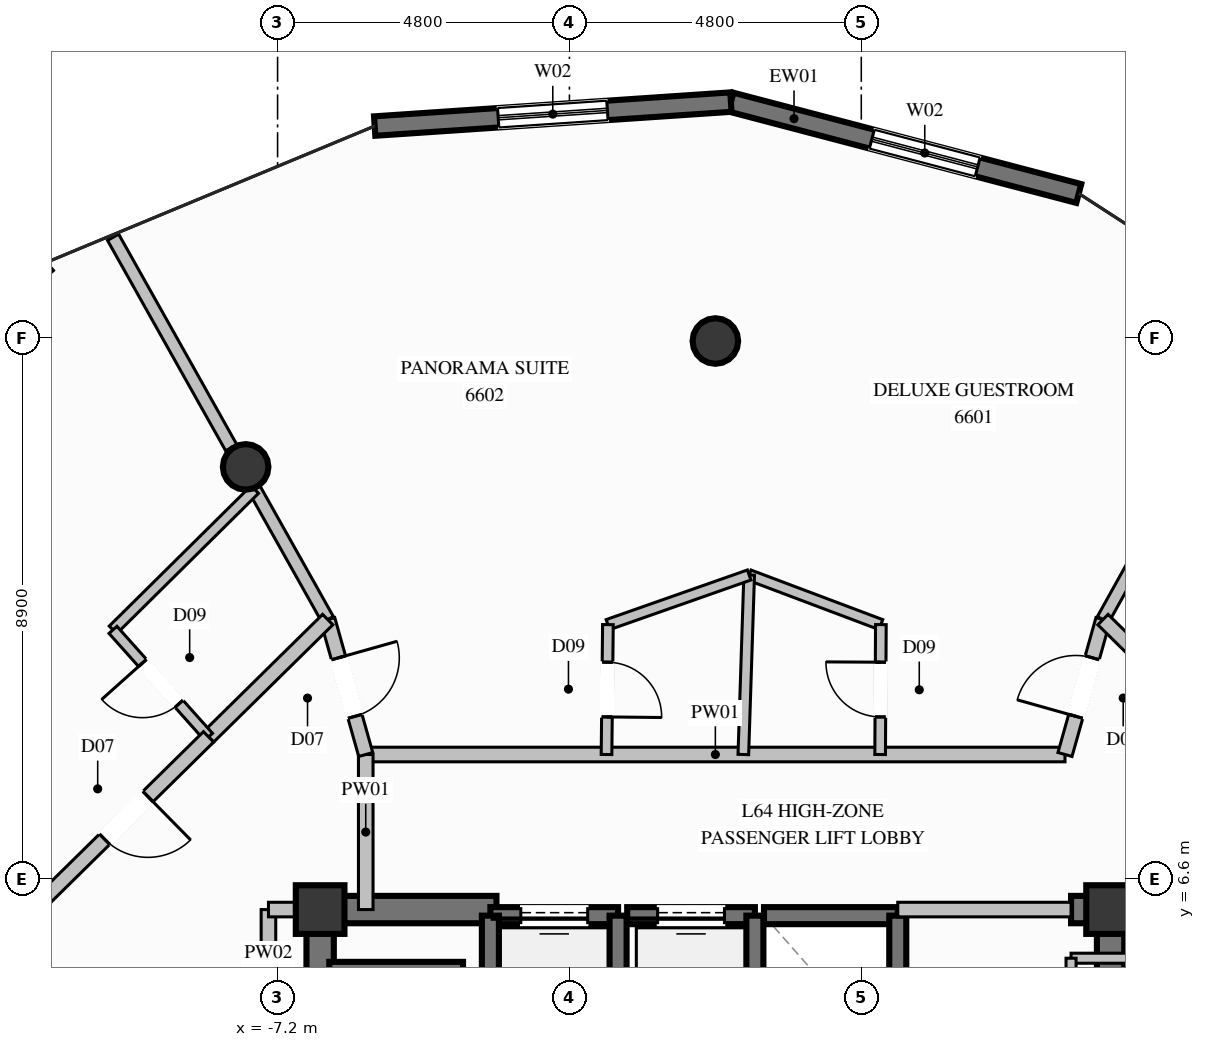
"""IFC4 building model, lengths in metres.
Left out: names, types, materials, properties, quantities, classifications, styles, units other than length and angle.
Written with IfcOpenShell. Run it as: python <this file> out.ifc"""

import sys

from ifc_helpers import new_model, si_unit, direction, frame, frame_2d, origin, origin_2d, place, context, subcontext, project, spatial, rectangle, circle, extrude, element, fill, save


model = new_model("IFC4")
c1 = context("Model", 3, precision=1e-05, world=origin(), true_north=direction((0.0, 1.0)))
c2 = subcontext(c1, "Body", "Model", "MODEL_VIEW")
j1 = project(units=[si_unit("LENGTHUNIT", "METRE"), si_unit("PLANEANGLEUNIT", "RADIAN")], contexts=[c1])
p1 = place(None, origin())
s1 = spatial("IfcSite", under=j1, at=p1, CompositionType="ELEMENT")
p2 = place(p1, origin())
s2 = spatial("IfcBuilding", under=s1, at=p2, CompositionType="ELEMENT")
p3 = place(p2, frame((0.0, 0.0, 246.8)))
s3 = spatial("IfcBuildingStorey", under=s2, at=p3, CompositionType="ELEMENT", Elevation=246.8)
for number, where, z_axis, x_axis in (
    (1, (6.5, 6.1, 0.0), (0.0, 0.0, 1.0), (1.0, 0.0, 0.0)),
    (2, (-6.5, 6.1, 0.0), (0.0, 0.0, 1.0), (1.0, 0.0, 0.0)),
):
    element("IfcColumn", number, at=place(p3, frame(where, z_axis=z_axis, x_axis=x_axis)), inside=s3, PredefinedType="COLUMN", context=c2, shape_type="SweptSolid", body=[
        extrude(rectangle(XDim=0.8, YDim=0.8, at=origin_2d()), origin(), (0.0, 0.0, 1.0), 3.8),
    ])
p4 = place(p3, frame((-6.275, 6.1, 0.0), z_axis=(0.0, 0.0, 1.0), x_axis=(1.0, 0.0, 0.0)))
e3 = element("IfcWall", 3, at=p4, inside=s3, PredefinedType="SHEAR", context=c2, shape_type="SweptSolid", body=[
    extrude(rectangle(XDim=2.675, YDim=0.45, at=frame_2d((1.337, 0.0))), origin(), (0.0, 0.0, 1.0), 3.8),
])
p5 = place(p3, frame((5.85, 6.1, 0.0), z_axis=(0.0, 0.0, 1.0), x_axis=(1.0, 0.0, 0.0)))
e4 = element("IfcWall", 4, at=p5, inside=s3, PredefinedType="SHEAR", context=c2, shape_type="SweptSolid", body=[
    extrude(rectangle(XDim=0.425, YDim=0.45, at=frame_2d((0.212, 0.0))), origin(), (0.0, 0.0, 1.0), 3.8),
])
p6 = place(p3, frame((-6.5, 2.35, 0.0), z_axis=(0.0, 0.0, 1.0), x_axis=(0.0, 1.0, 0.0)))
e5 = element("IfcWall", 5, at=p6, inside=s3, PredefinedType="SHEAR", context=c2, shape_type="SweptSolid", body=[
    extrude(rectangle(XDim=3.975, YDim=0.45, at=frame_2d((1.987, 0.0))), origin(), (0.0, 0.0, 1.0), 3.8),
])
p7 = place(p3, frame((6.5, 3.35, 0.0), z_axis=(0.0, 0.0, 1.0), x_axis=(0.0, 1.0, 0.0)))
e6 = element("IfcWall", 6, at=p7, inside=s3, PredefinedType="SHEAR", context=c2, shape_type="SweptSolid", body=[
    extrude(rectangle(XDim=2.975, YDim=0.45, at=frame_2d((1.487, 0.0))), origin(), (0.0, 0.0, 1.0), 3.8),
])
for number, where, z_axis, x_axis in (
    (7, (0.0, 15.45, 0.0), (0.0, 0.0, 1.0), (1.0, 0.0, 0.0)),
    (8, (-7.725, 13.38, 0.0), (0.0, 0.0, 1.0), (1.0, 0.0, 0.0)),
):
    element("IfcColumn", number, at=place(p3, frame(where, z_axis=z_axis, x_axis=x_axis)), inside=s3, PredefinedType="COLUMN", context=c2, shape_type="SweptSolid", body=[
        extrude(circle(Radius=0.375, at=origin_2d()), origin(), (0.0, 0.0, 1.0), 3.8),
    ])
p8 = place(p3, frame((0.256, 19.379, 0.0), z_axis=(0.0, 0.0, 1.0), x_axis=(0.967181914063, -0.254084917124, 0.0)))
e9 = element("IfcWall", 9, at=p8, inside=s3, PredefinedType="SOLIDWALL", context=c2, shape_type="SweptSolid", body=[
    extrude(rectangle(XDim=5.915, YDim=0.32, at=frame_2d((2.958, 0.0))), origin(), (0.0, 0.0, 1.0), 3.57),
])
p9 = place(p8, frame((2.396, 0.0, 0.35)))
e10 = element("IfcOpeningElement", 10, at=p9, cuts=e9, PredefinedType="OPENING", context=c2, shape_type="SweptSolid", body=[
    extrude(rectangle(XDim=1.8, YDim=2.6, at=frame_2d((0.9, 1.3))), frame((0.0, 0.17, 0.0), z_axis=(0.0, -1.0, 0.0), x_axis=(1.0, 0.0, 0.0)), (0.0, 0.0, 1.0), 0.34),
])
p10 = place(p3, frame((-5.603, 18.985, 0.0), z_axis=(0.0, 0.0, 1.0), x_axis=(0.997748955427, 0.067059838539, 0.0)))
e11 = element("IfcWall", 11, at=p10, inside=s3, PredefinedType="SOLIDWALL", context=c2, shape_type="SweptSolid", body=[
    extrude(rectangle(XDim=5.872, YDim=0.32, at=frame_2d((2.936, 0.0))), origin(), (0.0, 0.0, 1.0), 3.57),
])
p11 = place(p10, frame((2.036, 0.0, 0.35)))
e12 = element("IfcOpeningElement", 12, at=p11, cuts=e11, PredefinedType="OPENING", context=c2, shape_type="SweptSolid", body=[
    extrude(rectangle(XDim=1.8, YDim=2.6, at=frame_2d((0.9, 1.3))), frame((0.0, 0.17, 0.0), z_axis=(0.0, -1.0, 0.0), x_axis=(1.0, 0.0, 0.0)), (0.0, 0.0, 1.0), 0.34),
])
p12 = place(p3, frame((-1.6, 6.0, 0.0), z_axis=(0.0, 0.0, 1.0), x_axis=(-1.0, 0.0, 0.0)))
e13 = element("IfcWall", 13, at=p12, inside=s3, PredefinedType="SOLIDWALL", context=c2, shape_type="SweptSolid", body=[
    extrude(rectangle(XDim=2.1, YDim=0.28, at=frame_2d((1.05, 0.0))), origin(), (0.0, 0.0, 1.0), 3.57),
])
p13 = place(p12, frame((0.5, 0.0, 0.0)))
e14 = element("IfcOpeningElement", 14, at=p13, cuts=e13, PredefinedType="OPENING", context=c2, shape_type="SweptSolid", body=[
    extrude(rectangle(XDim=1.1, YDim=2.2, at=frame_2d((0.55, 1.1))), frame((0.0, 0.15, 0.0), z_axis=(0.0, -1.0, 0.0), x_axis=(1.0, 0.0, 0.0)), (0.0, 0.0, 1.0), 0.3),
])
for number, where, z_axis, x_axis in (
    (15, (-3.7, 6.0, 0.0), (0.0, 0.0, 1.0), (0.0, -1.0, 0.0)),
    (16, (-1.6, 3.5, 0.0), (0.0, 0.0, 1.0), (0.0, 1.0, 0.0)),
):
    element("IfcWall", number, at=place(p3, frame(where, z_axis=z_axis, x_axis=x_axis)), inside=s3, PredefinedType="SOLIDWALL", context=c2, shape_type="SweptSolid", body=[
        extrude(rectangle(XDim=2.5, YDim=0.28, at=frame_2d((1.25, 0.0))), origin(), (0.0, 0.0, 1.0), 3.57),
    ])
p14 = place(p3, frame((0.65, 6.0, 0.0), z_axis=(0.0, 0.0, 1.0), x_axis=(-1.0, 0.0, 0.0)))
e17 = element("IfcWall", 17, at=p14, inside=s3, PredefinedType="SOLIDWALL", context=c2, shape_type="SweptSolid", body=[
    extrude(rectangle(XDim=2.1, YDim=0.28, at=frame_2d((1.05, 0.0))), origin(), (0.0, 0.0, 1.0), 3.57),
])
p15 = place(p14, frame((0.5, 0.0, 0.0)))
e18 = element("IfcOpeningElement", 18, at=p15, cuts=e17, PredefinedType="OPENING", context=c2, shape_type="SweptSolid", body=[
    extrude(rectangle(XDim=1.1, YDim=2.2, at=frame_2d((0.55, 1.1))), frame((0.0, 0.15, 0.0), z_axis=(0.0, -1.0, 0.0), x_axis=(1.0, 0.0, 0.0)), (0.0, 0.0, 1.0), 0.3),
])
p16 = place(p3, frame((0.65, 3.5, 0.0), z_axis=(0.0, 0.0, 1.0), x_axis=(0.0, 1.0, 0.0)))
e19 = element("IfcWall", 19, at=p16, inside=s3, PredefinedType="SOLIDWALL", context=c2, shape_type="SweptSolid", body=[
    extrude(rectangle(XDim=2.5, YDim=0.28, at=frame_2d((1.25, 0.0))), origin(), (0.0, 0.0, 1.0), 3.57),
])
p17 = place(p3, frame((3.0, 6.0, 0.0), z_axis=(0.0, 0.0, 1.0), x_axis=(-1.0, 0.0, 0.0)))
e20 = element("IfcWall", 20, at=p17, inside=s3, PredefinedType="SOLIDWALL", context=c2, shape_type="SweptSolid", body=[
    extrude(rectangle(XDim=2.2, YDim=0.28, at=frame_2d((1.1, 0.0))), origin(), (0.0, 0.0, 1.0), 3.57),
])
p18 = place(p3, frame((3.0, 3.5, 0.0), z_axis=(0.0, 0.0, 1.0), x_axis=(0.0, 1.0, 0.0)))
e21 = element("IfcWall", 21, at=p18, inside=s3, PredefinedType="SOLIDWALL", context=c2, shape_type="SweptSolid", body=[
    extrude(rectangle(XDim=2.5, YDim=0.28, at=frame_2d((1.25, 0.0))), origin(), (0.0, 0.0, 1.0), 3.57),
])
p19 = place(p3, frame((-4.15, 5.1, 0.0), z_axis=(0.0, 0.0, 1.0), x_axis=(-1.0, 0.0, 0.0)))
e22 = element("IfcWall", 22, at=p19, inside=s3, PredefinedType="SOLIDWALL", context=c2, shape_type="SweptSolid", body=[
    extrude(rectangle(XDim=2.2, YDim=0.28, at=frame_2d((1.1, 0.0))), origin(), (0.0, 0.0, 1.0), 3.57),
])
p20 = place(p3, frame((-5.75, 8.65, 0.0), z_axis=(0.0, 0.0, 1.0), x_axis=(1.0, 0.0, 0.0)))
e23 = element("IfcWall", 23, at=p20, inside=s3, PredefinedType="PARTITIONING", context=c2, shape_type="SweptSolid", body=[
    extrude(rectangle(XDim=11.5, YDim=0.24, at=frame_2d((5.75, 0.0))), origin(), (0.0, 0.0, 1.0), 3.57),
])
p21 = place(p3, frame((3.0, 6.1, 0.0), z_axis=(0.0, 0.0, 1.0), x_axis=(1.0, 0.0, 0.0)))
e24 = element("IfcWall", 24, at=p21, inside=s3, PredefinedType="PARTITIONING", context=c2, shape_type="SweptSolid", body=[
    extrude(rectangle(XDim=2.85, YDim=0.24, at=frame_2d((1.425, 0.0))), origin(), (0.0, 0.0, 1.0), 2.655),
])
p22 = place(p3, frame((6.5, 6.1, 0.0), z_axis=(0.0, 0.0, 1.0), x_axis=(1.0, 0.0, 0.0)))
e25 = element("IfcWall", 25, at=p22, inside=s3, PredefinedType="PARTITIONING", context=c2, shape_type="SweptSolid", body=[
    extrude(rectangle(XDim=0.85, YDim=0.24, at=frame_2d((0.425, 0.0))), origin(), (0.0, 0.0, 1.0), 3.011),
])
p23 = place(p3, frame((-5.75, 6.1, 0.0), z_axis=(0.0, 0.0, 1.0), x_axis=(0.0, 1.0, 0.0)))
e26 = element("IfcWall", 26, at=p23, inside=s3, PredefinedType="PARTITIONING", context=c2, shape_type="SweptSolid", body=[
    extrude(rectangle(XDim=2.55, YDim=0.24, at=frame_2d((1.275, 0.0))), origin(), (0.0, 0.0, 1.0), 3.57),
])
p24 = place(p3, frame((-7.35, 4.95, 0.0), z_axis=(0.0, 0.0, 1.0), x_axis=(0.0, 1.0, 0.0)))
e27 = element("IfcWall", 27, at=p24, inside=s3, PredefinedType="PARTITIONING", context=c2, shape_type="SweptSolid", body=[
    extrude(rectangle(XDim=1.15, YDim=0.24, at=frame_2d((0.575, 0.0))), origin(), (0.0, 0.0, 1.0), 2.655),
])
p25 = place(p3, frame((-7.35, 6.1, 0.0), z_axis=(0.0, 0.0, 1.0), x_axis=(1.0, 0.0, 0.0)))
e28 = element("IfcWall", 28, at=p25, inside=s3, PredefinedType="PARTITIONING", context=c2, shape_type="SweptSolid", body=[
    extrude(rectangle(XDim=0.85, YDim=0.24, at=frame_2d((0.425, 0.0))), origin(), (0.0, 0.0, 1.0), 3.011),
])
p26 = place(p3, frame((7.35, 5.3, 0.0), z_axis=(0.0, 0.0, 1.0), x_axis=(-1.0, 0.0, 0.0)))
e29 = element("IfcWall", 29, at=p26, inside=s3, PredefinedType="PARTITIONING", context=c2, shape_type="SweptSolid", body=[
    extrude(rectangle(XDim=1.5, YDim=0.165, at=frame_2d((0.75, 0.0))), origin(), (0.0, 0.0, 1.0), 2.655),
])
p27 = place(p3, frame((5.85, 5.3, 0.0), z_axis=(0.0, 0.0, 1.0), x_axis=(0.0, -1.0, 0.0)))
e30 = element("IfcWall", 30, at=p27, inside=s3, PredefinedType="PARTITIONING", context=c2, shape_type="SweptSolid", body=[
    extrude(rectangle(XDim=2.55, YDim=0.165, at=frame_2d((1.275, 0.0))), origin(), (0.0, 0.0, 1.0), 2.655),
])
p28 = place(p3, frame((6.375, 10.869, 0.0), z_axis=(0.0, 0.0, 1.0), x_axis=(0.486620940413, 0.873613221255, 0.0)))
e31 = element("IfcWall", 31, at=p28, inside=s3, PredefinedType="PARTITIONING", context=c2, shape_type="SweptSolid", body=[
    extrude(rectangle(XDim=2.458, YDim=0.21, at=frame_2d((1.229, 0.0))), origin(), (0.0, 0.0, 1.0), 3.011),
])
p29 = place(p3, frame((-6.375, 10.869, 0.0), z_axis=(0.0, 0.0, 1.0), x_axis=(-0.489667191284, 0.871909422922, 0.0)))
e32 = element("IfcWall", 32, at=p29, inside=s3, PredefinedType="PARTITIONING", context=c2, shape_type="SweptSolid", body=[
    extrude(rectangle(XDim=2.459, YDim=0.21, at=frame_2d((1.229, 0.0))), origin(), (0.0, 0.0, 1.0), 3.011),
])
p30 = place(p3, frame((-7.962, 13.696, 0.0), z_axis=(0.0, 0.0, 1.0), x_axis=(-0.489665242016, 0.871910517634, 0.0)))
e33 = element("IfcWall", 33, at=p30, inside=s3, PredefinedType="PARTITIONING", context=c2, shape_type="SweptSolid", body=[
    extrude(rectangle(XDim=3.968, YDim=0.21, at=frame_2d((1.984, 0.0))), origin(), (0.0, 0.0, 1.0), 3.57),
])
p31 = place(p3, frame((0.556, 11.602, 0.0), z_axis=(0.0, 0.0, 1.0), x_axis=(0.935773181831, -0.35260254135, 0.0)))
e34 = element("IfcWall", 34, at=p31, inside=s3, PredefinedType="PLUMBINGWALL", context=c2, shape_type="SweptSolid", body=[
    extrude(rectangle(XDim=2.315, YDim=0.175, at=frame_2d((1.157, 0.0))), origin(), (0.0, 0.0, 1.0), 3.252),
])
p32 = place(p3, frame((0.556, 11.602, 0.0), z_axis=(0.0, 0.0, 1.0), x_axis=(-0.032483675207, -0.999472266171, 0.0)))
e35 = element("IfcWall", 35, at=p32, inside=s3, PredefinedType="PLUMBINGWALL", context=c2, shape_type="SweptSolid", body=[
    extrude(rectangle(XDim=2.954, YDim=0.175, at=frame_2d((1.477, 0.0))), origin(), (0.0, 0.0, 1.0), 3.57),
])
p33 = place(p3, frame((2.71, 8.65, 0.0), z_axis=(0.0, 0.0, 1.0), x_axis=(0.005600552237, 0.999984316784, 0.0)))
e36 = element("IfcWall", 36, at=p33, inside=s3, PredefinedType="PLUMBINGWALL", context=c2, shape_type="SweptSolid", body=[
    extrude(rectangle(XDim=2.136, YDim=0.175, at=frame_2d((1.068, 0.0))), origin(), (0.0, 0.0, 1.0), 3.57),
])
p34 = place(p33, frame((0.618, 0.0, 0.0)))
e37 = element("IfcOpeningElement", 37, at=p34, cuts=e36, PredefinedType="OPENING", context=c2, shape_type="SweptSolid", body=[
    extrude(rectangle(XDim=0.9, YDim=2.1, at=frame_2d((0.45, 1.05))), frame((0.0, 0.098, 0.0), z_axis=(0.0, -1.0, 0.0), x_axis=(1.0, 0.0, 0.0)), (0.0, 0.0, 1.0), 0.195),
])
p35 = place(p3, frame((5.75, 8.65, 0.0), z_axis=(0.0, 0.0, 1.0), x_axis=(0.271110513922, 0.962548226969, 0.0)))
e38 = element("IfcWall", 38, at=p35, inside=s3, PredefinedType="PARTITIONING", context=c2, shape_type="SweptSolid", body=[
    extrude(rectangle(XDim=2.305, YDim=0.24, at=frame_2d((1.153, 0.0))), origin(), (0.0, 0.0, 1.0), 3.57),
])
p36 = place(p35, frame((0.653, 0.0, 0.0)))
e39 = element("IfcOpeningElement", 39, at=p36, cuts=e38, PredefinedType="OPENING", context=c2, shape_type="SweptSolid", body=[
    extrude(rectangle(XDim=1.0, YDim=2.2, at=frame_2d((0.5, 1.1))), frame((0.0, 0.13, 0.0), z_axis=(0.0, -1.0, 0.0), x_axis=(1.0, 0.0, 0.0)), (0.0, 0.0, 1.0), 0.26),
])
p37 = place(p3, frame((-1.767, 10.786, 0.0), z_axis=(0.0, 0.0, 1.0), x_axis=(0.943463492061, 0.331476453385, 0.0)))
e40 = element("IfcWall", 40, at=p37, inside=s3, PredefinedType="PLUMBINGWALL", context=c2, shape_type="SweptSolid", body=[
    extrude(rectangle(XDim=2.462, YDim=0.175, at=frame_2d((1.231, 0.0))), origin(), (0.0, 0.0, 1.0), 3.252),
])
p38 = place(p3, frame((-1.767, 10.786, 0.0), z_axis=(0.0, 0.0, 1.0), x_axis=(-0.010743464968, -0.999942287315, 0.0)))
e41 = element("IfcWall", 41, at=p38, inside=s3, PredefinedType="PLUMBINGWALL", context=c2, shape_type="SweptSolid", body=[
    extrude(rectangle(XDim=2.136, YDim=0.175, at=frame_2d((1.068, 0.0))), origin(), (0.0, 0.0, 1.0), 3.57),
])
p39 = place(p38, frame((0.618, 0.0, 0.0)))
e42 = element("IfcOpeningElement", 42, at=p39, cuts=e41, PredefinedType="OPENING", context=c2, shape_type="SweptSolid", body=[
    extrude(rectangle(XDim=0.9, YDim=2.1, at=frame_2d((0.45, 1.05))), frame((0.0, 0.098, 0.0), z_axis=(0.0, -1.0, 0.0), x_axis=(1.0, 0.0, 0.0)), (0.0, 0.0, 1.0), 0.195),
])
p40 = place(p3, frame((-6.375, 10.869, 0.0), z_axis=(0.0, 0.0, 1.0), x_axis=(0.271110513922, -0.962548226969, 0.0)))
e43 = element("IfcWall", 43, at=p40, inside=s3, PredefinedType="PARTITIONING", context=c2, shape_type="SweptSolid", body=[
    extrude(rectangle(XDim=2.305, YDim=0.24, at=frame_2d((1.153, 0.0))), origin(), (0.0, 0.0, 1.0), 3.57),
])
p41 = place(p40, frame((0.653, 0.0, 0.0)))
e44 = element("IfcOpeningElement", 44, at=p41, cuts=e43, PredefinedType="OPENING", context=c2, shape_type="SweptSolid", body=[
    extrude(rectangle(XDim=1.0, YDim=2.2, at=frame_2d((0.5, 1.1))), frame((0.0, 0.13, 0.0), z_axis=(0.0, -1.0, 0.0), x_axis=(1.0, 0.0, 0.0)), (0.0, 0.0, 1.0), 0.26),
])
p42 = place(p3, frame((-6.375, 10.869, 0.0), z_axis=(0.0, 0.0, 1.0), x_axis=(-0.712721806089, -0.701446809904, 0.0)))
e45 = element("IfcWall", 45, at=p42, inside=s3, PredefinedType="PARTITIONING", context=c2, shape_type="SweptSolid", body=[
    extrude(rectangle(XDim=2.75, YDim=0.24, at=frame_2d((1.375, 0.0))), origin(), (0.0, 0.0, 1.0), 3.57),
])
p43 = place(p3, frame((-7.575, 13.007, 0.0), z_axis=(0.0, 0.0, 1.0), x_axis=(-0.710892186869, -0.703301001456, 0.0)))
e46 = element("IfcWall", 46, at=p43, inside=s3, PredefinedType="PLUMBINGWALL", context=c2, shape_type="SweptSolid", body=[
    extrude(rectangle(XDim=3.281, YDim=0.175, at=frame_2d((1.64, 0.0))), origin(), (0.0, 0.0, 1.0), 3.139),
])
p44 = place(p3, frame((-8.335, 8.94, 0.0), z_axis=(0.0, 0.0, 1.0), x_axis=(-0.666153503552, 0.745814661766, 0.0)))
e47 = element("IfcWall", 47, at=p44, inside=s3, PredefinedType="PLUMBINGWALL", context=c2, shape_type="SweptSolid", body=[
    extrude(rectangle(XDim=2.36, YDim=0.175, at=frame_2d((1.18, 0.0))), origin(), (0.0, 0.0, 1.0), 3.57),
])
p45 = place(p44, frame((0.73, 0.0, 0.0)))
e48 = element("IfcOpeningElement", 48, at=p45, cuts=e47, PredefinedType="OPENING", context=c2, shape_type="SweptSolid", body=[
    extrude(rectangle(XDim=0.9, YDim=2.1, at=frame_2d((0.45, 1.05))), frame((0.0, 0.098, 0.0), z_axis=(0.0, -1.0, 0.0), x_axis=(1.0, 0.0, 0.0)), (0.0, 0.0, 1.0), 0.195),
])
p46 = place(p3, frame((-8.335, 8.94, 0.0), z_axis=(0.0, 0.0, 1.0), x_axis=(-0.712612295011, -0.701558063883, 0.0)))
e49 = element("IfcWall", 49, at=p46, inside=s3, PredefinedType="PARTITIONING", context=c2, shape_type="SweptSolid", body=[
    extrude(rectangle(XDim=3.799, YDim=0.24, at=frame_2d((1.899, 0.0))), origin(), (0.0, 0.0, 1.0), 3.57),
])
p47 = place(p46, frame((1.399, 0.0, 0.0)))
e50 = element("IfcOpeningElement", 50, at=p47, cuts=e49, PredefinedType="OPENING", context=c2, shape_type="SweptSolid", body=[
    extrude(rectangle(XDim=1.0, YDim=2.2, at=frame_2d((0.5, 1.1))), frame((0.0, 0.13, 0.0), z_axis=(0.0, -1.0, 0.0), x_axis=(1.0, 0.0, 0.0)), (0.0, 0.0, 1.0), 0.26),
])
p48 = place(p3, frame((9.082, 8.204, 0.0), z_axis=(0.0, 0.0, 1.0), x_axis=(-0.712644426178, 0.70152542494, 0.0)))
e51 = element("IfcWall", 51, at=p48, inside=s3, PredefinedType="PARTITIONING", context=c2, shape_type="SweptSolid", body=[
    extrude(rectangle(XDim=3.799, YDim=0.24, at=frame_2d((1.899, 0.0))), origin(), (0.0, 0.0, 1.0), 3.57),
])
p49 = place(p48, frame((1.399, 0.0, 0.0)))
e52 = element("IfcOpeningElement", 52, at=p49, cuts=e51, PredefinedType="OPENING", context=c2, shape_type="SweptSolid", body=[
    extrude(rectangle(XDim=1.0, YDim=2.2, at=frame_2d((0.5, 1.1))), frame((0.0, 0.13, 0.0), z_axis=(0.0, -1.0, 0.0), x_axis=(1.0, 0.0, 0.0)), (0.0, 0.0, 1.0), 0.26),
])
p50 = place(p9, origin())
e53 = element("IfcWindow", 53, at=p50, inside=s3, PartitioningType="SINGLE_PANEL", PredefinedType="WINDOW", context=c2, shape_type="SweptSolid", body=[
    extrude(rectangle(XDim=1.8, YDim=2.6, at=frame_2d((0.9, 1.3))), frame((0.0, 0.03, 0.0), z_axis=(0.0, -1.0, 0.0), x_axis=(1.0, 0.0, 0.0)), (0.0, 0.0, 1.0), 0.06),
])
fill(e10, e53)
p51 = place(p11, origin())
e54 = element("IfcWindow", 54, at=p51, inside=s3, PartitioningType="SINGLE_PANEL", PredefinedType="WINDOW", context=c2, shape_type="SweptSolid", body=[
    extrude(rectangle(XDim=1.8, YDim=2.6, at=frame_2d((0.9, 1.3))), frame((0.0, 0.03, 0.0), z_axis=(0.0, -1.0, 0.0), x_axis=(1.0, 0.0, 0.0)), (0.0, 0.0, 1.0), 0.06),
])
fill(e12, e54)
p52 = place(p13, origin())
e55 = element("IfcDoor", 55, at=p52, inside=s3, OperationType="SLIDING_TO_LEFT", PredefinedType="DOOR", context=c2, shape_type="SweptSolid", body=[
    extrude(rectangle(XDim=1.1, YDim=2.2, at=frame_2d((0.55, 1.1))), frame((0.0, 0.025, 0.0), z_axis=(0.0, -1.0, 0.0), x_axis=(1.0, 0.0, 0.0)), (0.0, 0.0, 1.0), 0.05),
])
fill(e14, e55)
p53 = place(p15, origin())
e56 = element("IfcDoor", 56, at=p53, inside=s3, OperationType="SLIDING_TO_LEFT", PredefinedType="DOOR", context=c2, shape_type="SweptSolid", body=[
    extrude(rectangle(XDim=1.1, YDim=2.2, at=frame_2d((0.55, 1.1))), frame((0.0, 0.025, 0.0), z_axis=(0.0, -1.0, 0.0), x_axis=(1.0, 0.0, 0.0)), (0.0, 0.0, 1.0), 0.05),
])
fill(e18, e56)
p54 = place(p34, origin())
e57 = element("IfcDoor", 57, at=p54, inside=s3, OperationType="SINGLE_SWING_RIGHT", PredefinedType="DOOR", context=c2, shape_type="SweptSolid", body=[
    extrude(rectangle(XDim=0.9, YDim=2.1, at=frame_2d((0.45, 1.05))), frame((0.0, 0.025, 0.0), z_axis=(0.0, -1.0, 0.0), x_axis=(1.0, 0.0, 0.0)), (0.0, 0.0, 1.0), 0.05),
])
fill(e37, e57)
p55 = place(p36, origin())
e58 = element("IfcDoor", 58, at=p55, inside=s3, OperationType="SINGLE_SWING_LEFT", PredefinedType="DOOR", context=c2, shape_type="SweptSolid", body=[
    extrude(rectangle(XDim=1.0, YDim=2.2, at=frame_2d((0.5, 1.1))), frame((0.0, 0.025, 0.0), z_axis=(0.0, -1.0, 0.0), x_axis=(1.0, 0.0, 0.0)), (0.0, 0.0, 1.0), 0.05),
])
fill(e39, e58)
p56 = place(p39, origin())
e59 = element("IfcDoor", 59, at=p56, inside=s3, OperationType="SINGLE_SWING_RIGHT", PredefinedType="DOOR", context=c2, shape_type="SweptSolid", body=[
    extrude(rectangle(XDim=0.9, YDim=2.1, at=frame_2d((0.45, 1.05))), frame((0.0, 0.025, 0.0), z_axis=(0.0, -1.0, 0.0), x_axis=(1.0, 0.0, 0.0)), (0.0, 0.0, 1.0), 0.05),
])
fill(e42, e59)
p57 = place(p41, origin())
e60 = element("IfcDoor", 60, at=p57, inside=s3, OperationType="SINGLE_SWING_LEFT", PredefinedType="DOOR", context=c2, shape_type="SweptSolid", body=[
    extrude(rectangle(XDim=1.0, YDim=2.2, at=frame_2d((0.5, 1.1))), frame((0.0, 0.025, 0.0), z_axis=(0.0, -1.0, 0.0), x_axis=(1.0, 0.0, 0.0)), (0.0, 0.0, 1.0), 0.05),
])
fill(e44, e60)
p58 = place(p45, origin())
e61 = element("IfcDoor", 61, at=p58, inside=s3, OperationType="SINGLE_SWING_RIGHT", PredefinedType="DOOR", context=c2, shape_type="SweptSolid", body=[
    extrude(rectangle(XDim=0.9, YDim=2.1, at=frame_2d((0.45, 1.05))), frame((0.0, 0.025, 0.0), z_axis=(0.0, -1.0, 0.0), x_axis=(1.0, 0.0, 0.0)), (0.0, 0.0, 1.0), 0.05),
])
fill(e48, e61)
p59 = place(p47, origin())
e62 = element("IfcDoor", 62, at=p59, inside=s3, OperationType="SINGLE_SWING_LEFT", PredefinedType="DOOR", context=c2, shape_type="SweptSolid", body=[
    extrude(rectangle(XDim=1.0, YDim=2.2, at=frame_2d((0.5, 1.1))), frame((0.0, 0.025, 0.0), z_axis=(0.0, -1.0, 0.0), x_axis=(1.0, 0.0, 0.0)), (0.0, 0.0, 1.0), 0.05),
])
fill(e50, e62)
save(model, sys.argv[1])
